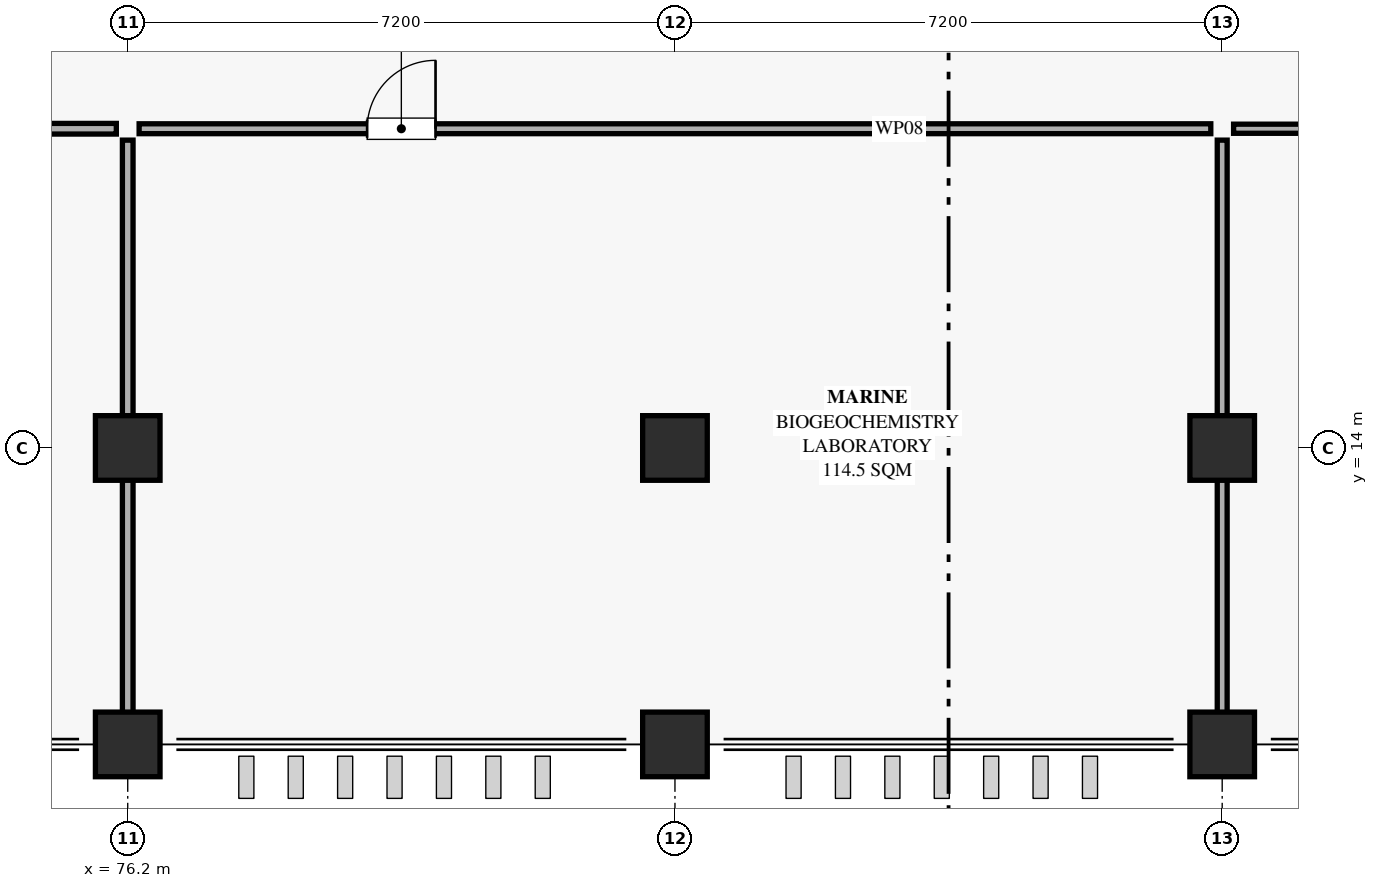
"""IFC4 building model, lengths in metres.
Left out: names, types, materials, properties, quantities, classifications, styles, units other than length and angle.
Written with IfcOpenShell. Run it as: python <this file> out.ifc"""

import sys

from ifc_helpers import new_model, si_unit, direction, frame, frame_2d, origin, origin_2d, place, context, subcontext, project, spatial, rectangle, extrude, element, fill, save


model = new_model("IFC4")
c1 = context("Model", 3, precision=1e-05, world=origin(), true_north=direction((0.0, 1.0)))
c2 = subcontext(c1, "Body", "Model", "MODEL_VIEW")
j1 = project(units=[si_unit("LENGTHUNIT", "METRE"), si_unit("PLANEANGLEUNIT", "RADIAN")], contexts=[c1])
p1 = place(None, origin())
s1 = spatial("IfcSite", under=j1, at=p1, CompositionType="ELEMENT")
p2 = place(p1, origin())
s2 = spatial("IfcBuilding", under=s1, at=p2, CompositionType="ELEMENT")
p3 = place(p2, frame((0.0, 0.0, 15.12)))
s3 = spatial("IfcBuildingStorey", under=s2, at=p3, CompositionType="ELEMENT", Elevation=15.12)
for number, where, z_axis, x_axis in (
    (1, (76.2, 10.1, 0.0), (0.0, 0.0, 1.0), (1.0, 0.0, 0.0)),
    (2, (83.4, 10.1, 0.0), (0.0, 0.0, 1.0), (1.0, 0.0, 0.0)),
    (3, (90.6, 10.1, 0.0), (0.0, 0.0, 1.0), (1.0, 0.0, 0.0)),
    (4, (76.2, 14.0, 0.0), (0.0, 0.0, 1.0), (1.0, 0.0, 0.0)),
    (5, (83.4, 14.0, 0.0), (0.0, 0.0, 1.0), (1.0, 0.0, 0.0)),
    (6, (90.6, 14.0, 0.0), (0.0, 0.0, 1.0), (1.0, 0.0, 0.0)),
):
    element("IfcColumn", number, at=place(p3, frame(where, z_axis=z_axis, x_axis=x_axis)), inside=s3, PredefinedType="COLUMN", context=c2, shape_type="SweptSolid", body=[
        extrude(rectangle(XDim=0.85, YDim=0.85, at=origin_2d()), origin(), (0.0, 0.0, 1.0), 4.68),
    ])
p4 = place(p3, frame((54.95, 18.2, 0.0), z_axis=(0.0, 0.0, 1.0), x_axis=(1.0, 0.0, 0.0)))
e7 = element("IfcWall", 7, at=p4, inside=s3, PredefinedType="PARTITIONING", context=c2, shape_type="SweptSolid", body=[
    extrude(rectangle(XDim=21.1, YDim=0.14, at=frame_2d((10.55, 0.0))), origin(), (0.0, 0.0, 1.0), 3.16),
])
p5 = place(p4, frame((2.8, 0.0, 0.0)))
e8 = element("IfcOpeningElement", 8, at=p5, cuts=e7, PredefinedType="OPENING", context=c2, shape_type="SweptSolid", body=[
    extrude(rectangle(XDim=0.9, YDim=2.16, at=frame_2d((0.45, 1.08))), frame((0.0, 0.08, 0.0), z_axis=(0.0, -1.0, 0.0), x_axis=(1.0, 0.0, 0.0)), (0.0, 0.0, 1.0), 0.16),
])
p6 = place(p3, frame((76.2, 18.05, 0.0), z_axis=(0.0, 0.0, 1.0), x_axis=(0.0, -1.0, 0.0)))
e9 = element("IfcWall", 9, at=p6, inside=s3, PredefinedType="PARTITIONING", context=c2, shape_type="SweptSolid", body=[
    extrude(rectangle(XDim=7.65, YDim=0.14, at=frame_2d((3.825, 0.0))), origin(), (0.0, 0.0, 1.0), 3.16),
])
p7 = place(p3, frame((76.35, 18.2, 0.0), z_axis=(0.0, 0.0, 1.0), x_axis=(1.0, 0.0, 0.0)))
e10 = element("IfcWall", 10, at=p7, inside=s3, PredefinedType="PARTITIONING", context=c2, shape_type="SweptSolid", body=[
    extrude(rectangle(XDim=14.1, YDim=0.13, at=frame_2d((7.05, 0.0))), origin(), (0.0, 0.0, 1.0), 3.16),
])
p8 = place(p7, frame((3.0, 0.0, 0.0)))
e11 = element("IfcOpeningElement", 11, at=p8, cuts=e10, PredefinedType="OPENING", context=c2, shape_type="SweptSolid", body=[
    extrude(rectangle(XDim=0.9, YDim=2.22, at=frame_2d((0.45, 1.11))), frame((0.0, 0.075, 0.0), z_axis=(0.0, -1.0, 0.0), x_axis=(1.0, 0.0, 0.0)), (0.0, 0.0, 1.0), 0.15),
])
p9 = place(p3, frame((90.6, 18.05, 0.0), z_axis=(0.0, 0.0, 1.0), x_axis=(0.0, -1.0, 0.0)))
e12 = element("IfcWall", 12, at=p9, inside=s3, PredefinedType="PARTITIONING", context=c2, shape_type="SweptSolid", body=[
    extrude(rectangle(XDim=7.65, YDim=0.13, at=frame_2d((3.825, 0.0))), origin(), (0.0, 0.0, 1.0), 3.16),
])
p10 = place(p3, frame((90.75, 18.2, 0.0), z_axis=(0.0, 0.0, 1.0), x_axis=(1.0, 0.0, 0.0)))
e13 = element("IfcWall", 13, at=p10, inside=s3, PredefinedType="PARTITIONING", context=c2, shape_type="SweptSolid", body=[
    extrude(rectangle(XDim=28.3, YDim=0.12, at=frame_2d((14.15, 0.0))), origin(), (0.0, 0.0, 1.0), 3.16),
])
p11 = place(p10, frame((24.585, 0.0, 0.0)))
e14 = element("IfcOpeningElement", 14, at=p11, cuts=e13, PredefinedType="OPENING", context=c2, shape_type="SweptSolid", body=[
    extrude(rectangle(XDim=0.93, YDim=2.05, at=frame_2d((0.465, 1.025))), frame((0.0, 0.07, 0.0), z_axis=(0.0, -1.0, 0.0), x_axis=(1.0, 0.0, 0.0)), (0.0, 0.0, 1.0), 0.14),
])
p12 = place(p8, origin())
e15 = element("IfcDoor", 15, at=p12, inside=s3, OperationType="SINGLE_SWING_RIGHT", PredefinedType="DOOR", context=c2, shape_type="SweptSolid", body=[
    extrude(rectangle(XDim=0.9, YDim=2.22, at=frame_2d((0.45, 1.11))), frame((0.0, 0.025, 0.0), z_axis=(0.0, -1.0, 0.0), x_axis=(1.0, 0.0, 0.0)), (0.0, 0.0, 1.0), 0.05),
])
fill(e11, e15)
save(model, sys.argv[1])
